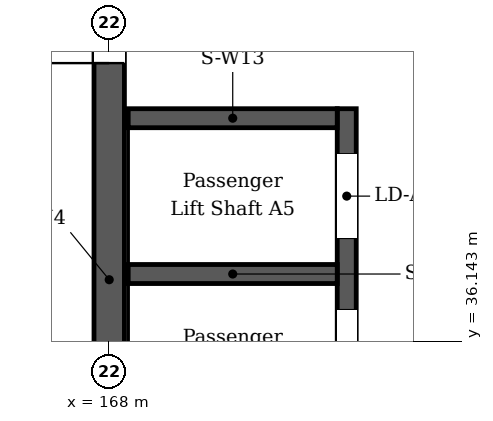
"""IFC4 building model, lengths in metres.
Left out: names, types, materials, properties, quantities, classifications, styles, units other than length and angle.
Written with IfcOpenShell. Run it as: python <this file> out.ifc"""

import sys

from ifc_helpers import new_model, si_unit, direction, frame, frame_2d, origin, place, context, subcontext, project, spatial, rectangle, extrude, element, fill, save


model = new_model("IFC4")
c1 = context("Model", 3, precision=1e-05, world=origin(), true_north=direction((0.0, 1.0)))
c2 = subcontext(c1, "Body", "Model", "MODEL_VIEW")
j1 = project(units=[si_unit("LENGTHUNIT", "METRE"), si_unit("PLANEANGLEUNIT", "RADIAN")], contexts=[c1])
p1 = place(None, origin())
s1 = spatial("IfcSite", under=j1, at=p1, CompositionType="ELEMENT")
p2 = place(p1, origin())
s2 = spatial("IfcBuilding", under=s1, at=p2, CompositionType="ELEMENT")
p3 = place(p2, frame((0.0, 0.0, 56.4)))
s3 = spatial("IfcBuildingStorey", under=s2, at=p3, CompositionType="ELEMENT", Elevation=56.4)
p4 = place(p3, frame((168.0, 25.4, 0.0), z_axis=(0.0, 0.0, 1.0), x_axis=(0.0, 1.0, 0.0)))
e1 = element("IfcWall", 1, at=p4, inside=s3, PredefinedType="SOLIDWALL", context=c2, shape_type="SweptSolid", body=[
    extrude(rectangle(XDim=16.4, YDim=0.4, at=frame_2d((8.2, 0.0))), origin(), (0.0, 0.0, 1.0), 4.05),
])
p5 = place(p4, frame((1.0, 0.0, 0.0)))
e2 = element("IfcOpeningElement", 2, at=p5, cuts=e1, PredefinedType="OPENING", context=c2, shape_type="SweptSolid", body=[
    extrude(rectangle(XDim=1.0, YDim=2.1, at=frame_2d((0.5, 1.05))), frame((0.0, 0.21, 0.0), z_axis=(0.0, -1.0, 0.0), x_axis=(1.0, 0.0, 0.0)), (0.0, 0.0, 1.0), 0.42),
])
p6 = place(p4, frame((14.4, 0.0, 0.0)))
e3 = element("IfcOpeningElement", 3, at=p6, cuts=e1, PredefinedType="OPENING", context=c2, shape_type="SweptSolid", body=[
    extrude(rectangle(XDim=1.4, YDim=2.1, at=frame_2d((0.7, 1.05))), frame((0.0, 0.21, 0.0), z_axis=(0.0, -1.0, 0.0), x_axis=(1.0, 0.0, 0.0)), (0.0, 0.0, 1.0), 0.42),
])
p7 = place(p3, frame((171.125, 28.3, 0.0), z_axis=(0.0, 0.0, 1.0), x_axis=(0.0, 1.0, 0.0)))
e4 = element("IfcWall", 4, at=p7, inside=s3, PredefinedType="SOLIDWALL", context=c2, shape_type="SweptSolid", body=[
    extrude(rectangle(XDim=10.9, YDim=0.25, at=frame_2d((5.45, 0.0))), origin(), (0.0, 0.0, 1.0), 4.05),
])
p8 = place(p7, frame((0.8, 0.0, 0.0)))
e5 = element("IfcOpeningElement", 5, at=p8, cuts=e4, PredefinedType="OPENING", context=c2, shape_type="SweptSolid", body=[
    extrude(rectangle(XDim=1.1, YDim=2.1, at=frame_2d((0.55, 1.05))), frame((0.0, 0.135, 0.0), z_axis=(0.0, -1.0, 0.0), x_axis=(1.0, 0.0, 0.0)), (0.0, 0.0, 1.0), 0.27),
])
p9 = place(p7, frame((3.05, 0.0, 0.0)))
e6 = element("IfcOpeningElement", 6, at=p9, cuts=e4, PredefinedType="OPENING", context=c2, shape_type="SweptSolid", body=[
    extrude(rectangle(XDim=1.1, YDim=2.1, at=frame_2d((0.55, 1.05))), frame((0.0, 0.135, 0.0), z_axis=(0.0, -1.0, 0.0), x_axis=(1.0, 0.0, 0.0)), (0.0, 0.0, 1.0), 0.27),
])
p10 = place(p7, frame((5.1, 0.0, 0.0)))
e7 = element("IfcOpeningElement", 7, at=p10, cuts=e4, PredefinedType="OPENING", context=c2, shape_type="SweptSolid", body=[
    extrude(rectangle(XDim=1.1, YDim=2.1, at=frame_2d((0.55, 1.05))), frame((0.0, 0.135, 0.0), z_axis=(0.0, -1.0, 0.0), x_axis=(1.0, 0.0, 0.0)), (0.0, 0.0, 1.0), 0.27),
])
p11 = place(p7, frame((7.15, 0.0, 0.0)))
e8 = element("IfcOpeningElement", 8, at=p11, cuts=e4, PredefinedType="OPENING", context=c2, shape_type="SweptSolid", body=[
    extrude(rectangle(XDim=1.1, YDim=2.1, at=frame_2d((0.55, 1.05))), frame((0.0, 0.135, 0.0), z_axis=(0.0, -1.0, 0.0), x_axis=(1.0, 0.0, 0.0)), (0.0, 0.0, 1.0), 0.27),
])
p12 = place(p7, frame((9.2, 0.0, 0.0)))
e9 = element("IfcOpeningElement", 9, at=p12, cuts=e4, PredefinedType="OPENING", context=c2, shape_type="SweptSolid", body=[
    extrude(rectangle(XDim=1.1, YDim=2.1, at=frame_2d((0.55, 1.05))), frame((0.0, 0.135, 0.0), z_axis=(0.0, -1.0, 0.0), x_axis=(1.0, 0.0, 0.0)), (0.0, 0.0, 1.0), 0.27),
])
for number, where, z_axis, x_axis in (
    (10, (168.25, 37.025, 0.0), (0.0, 0.0, 1.0), (1.0, 0.0, 0.0)),
    (11, (168.25, 39.075, 0.0), (0.0, 0.0, 1.0), (1.0, 0.0, 0.0)),
):
    element("IfcWall", number, at=place(p3, frame(where, z_axis=z_axis, x_axis=x_axis)), inside=s3, PredefinedType="SOLIDWALL", context=c2, shape_type="SweptSolid", body=[
        extrude(rectangle(XDim=2.75, YDim=0.25, at=frame_2d((1.375, 0.0))), origin(), (0.0, 0.0, 1.0), 4.05),
    ])
p13 = place(p11, origin())
e12 = element("IfcDoor", 12, at=p13, inside=s3, OperationType="SLIDING_TO_LEFT", PredefinedType="DOOR", context=c2, shape_type="SweptSolid", body=[
    extrude(rectangle(XDim=1.1, YDim=2.1, at=frame_2d((0.55, 1.05))), frame((0.0, 0.025, 0.0), z_axis=(0.0, -1.0, 0.0), x_axis=(1.0, 0.0, 0.0)), (0.0, 0.0, 1.0), 0.05),
])
fill(e8, e12)
p14 = place(p12, origin())
e13 = element("IfcDoor", 13, at=p14, inside=s3, OperationType="SLIDING_TO_LEFT", PredefinedType="DOOR", context=c2, shape_type="SweptSolid", body=[
    extrude(rectangle(XDim=1.1, YDim=2.1, at=frame_2d((0.55, 1.05))), frame((0.0, 0.025, 0.0), z_axis=(0.0, -1.0, 0.0), x_axis=(1.0, 0.0, 0.0)), (0.0, 0.0, 1.0), 0.05),
])
fill(e9, e13)
p15 = place(p6, origin())
e14 = element("IfcDoor", 14, at=p15, inside=s3, OperationType="DOUBLE_DOOR_DOUBLE_SWING", PredefinedType="DOOR", context=c2, shape_type="SweptSolid", body=[
    extrude(rectangle(XDim=1.4, YDim=2.1, at=frame_2d((0.7, 1.05))), frame((0.0, 0.025, 0.0), z_axis=(0.0, -1.0, 0.0), x_axis=(1.0, 0.0, 0.0)), (0.0, 0.0, 1.0), 0.05),
])
fill(e3, e14)
save(model, sys.argv[1])
